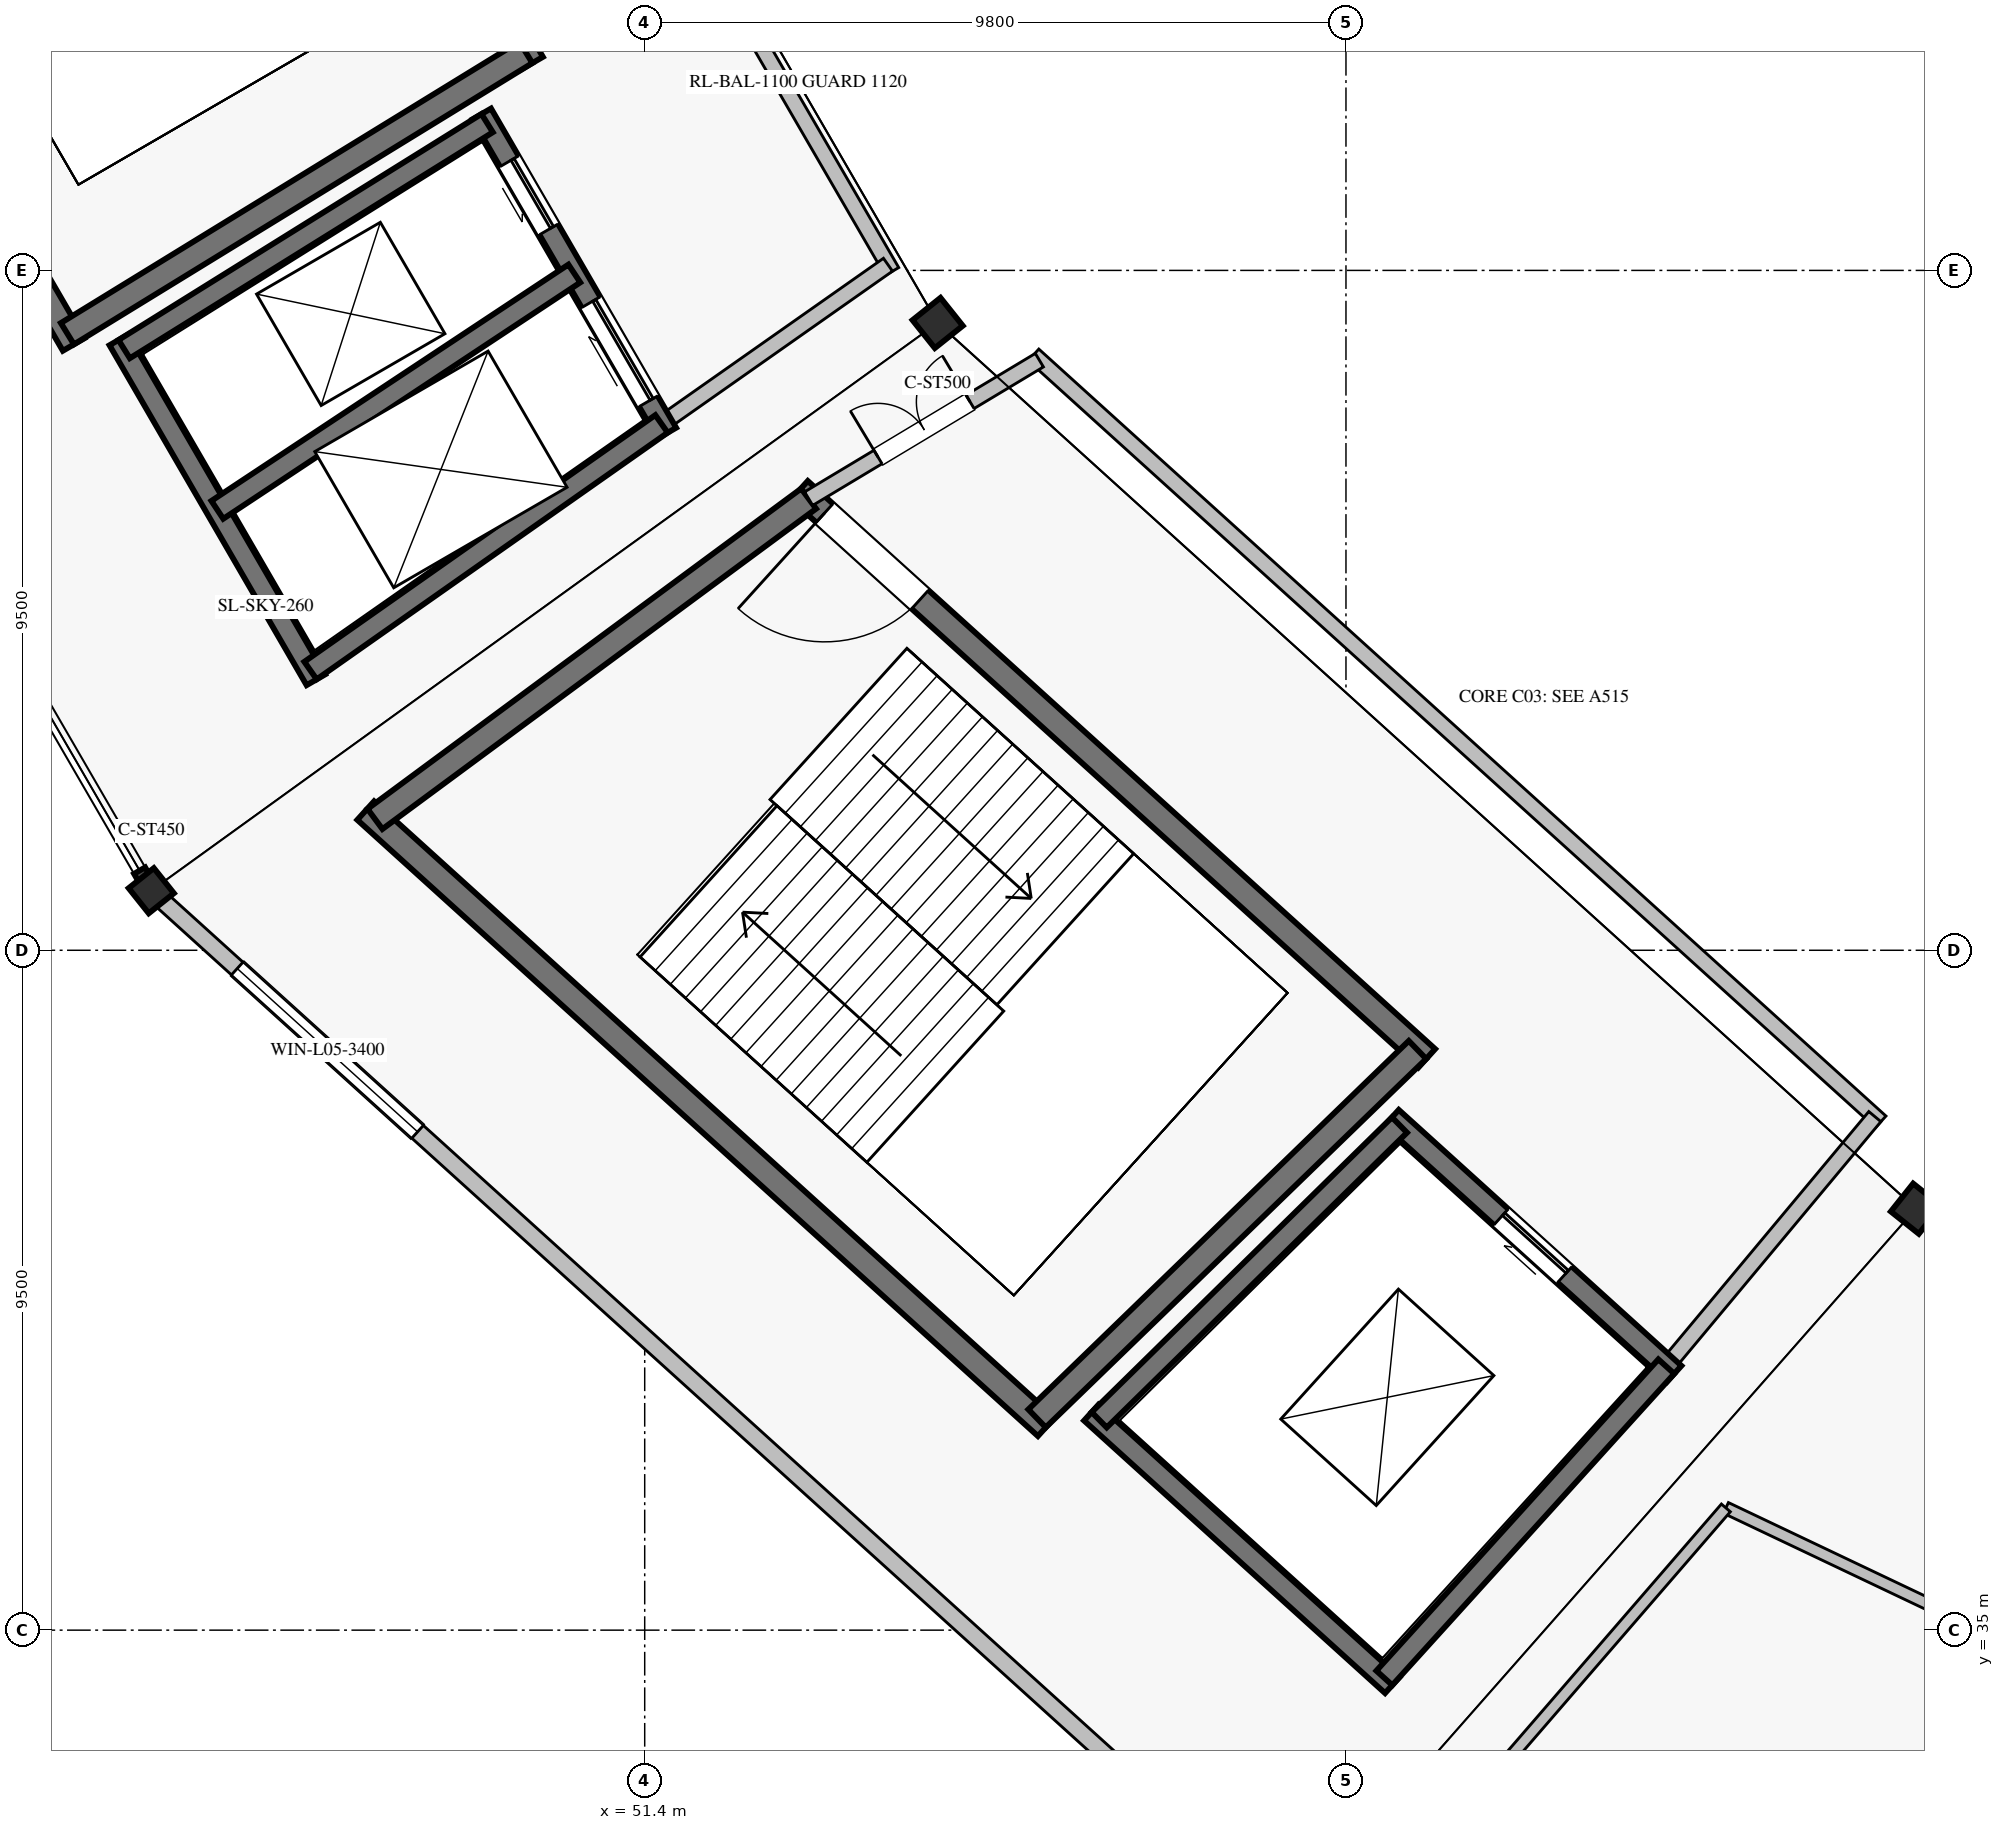
"""IFC4 building model, lengths in metres.
Left out: names, types, materials, properties, quantities, classifications, styles, units other than length and angle.
Written with IfcOpenShell. Run it as: python <this file> out.ifc"""

import sys

from ifc_helpers import new_model, si_unit, direction, frame, frame_2d, origin, origin_2d, place, context, subcontext, project, spatial, rectangle, hollow_rectangle, extrude, element, fill, save


model = new_model("IFC4")
c1 = context("Model", 3, precision=1e-05, world=origin(), true_north=direction((0.0, 1.0)))
c2 = subcontext(c1, "Body", "Model", "MODEL_VIEW")
j1 = project(units=[si_unit("LENGTHUNIT", "METRE"), si_unit("PLANEANGLEUNIT", "RADIAN")], contexts=[c1])
p1 = place(None, origin())
s1 = spatial("IfcSite", under=j1, at=p1, CompositionType="ELEMENT")
p2 = place(p1, origin())
s2 = spatial("IfcBuilding", under=s1, at=p2, CompositionType="ELEMENT")
p3 = place(p2, frame((0.0, 0.0, 25.84)))
s3 = spatial("IfcBuildingStorey", under=s2, at=p3, CompositionType="ELEMENT", Elevation=25.84)
for number, where, z_axis, x_axis in (
    (1, (55.494, 53.266, 0.0), (0.0, 0.0, 1.0), (-0.782, -0.623, 0.0)),
    (2, (69.166, 40.889, 0.0), (0.0, 0.0, 1.0), (-0.623, -0.782, 0.0)),
):
    element("IfcColumn", number, at=place(p3, frame(where, z_axis=z_axis, x_axis=x_axis)), inside=s3, PredefinedType="COLUMN", context=c2, shape_type="SweptSolid", body=[
        extrude(hollow_rectangle(XDim=0.5, YDim=0.5, WallThickness=0.022, at=origin_2d()), origin(), (0.0, 0.0, 1.0), 5.44),
    ])
p4 = place(p3, frame((44.505, 45.332, 0.0), z_axis=(0.0, 0.0, 1.0), x_axis=(-0.781831482473, -0.623489801853, 0.0)))
e3 = element("IfcColumn", 3, at=p4, inside=s3, PredefinedType="COLUMN", context=c2, shape_type="SweptSolid", body=[
    extrude(hollow_rectangle(XDim=0.45, YDim=0.45, WallThickness=0.022, at=origin_2d()), origin(), (0.0, 0.0, 1.0), 5.44),
])
p5 = place(p3, frame((44.668, 45.185, 0.0), z_axis=(0.0, 0.0, 1.0), x_axis=(0.741349049196, -0.671119651967, 0.0)))
e4 = element("IfcWall", 4, at=p5, inside=s3, PredefinedType="SOLIDWALL", context=c2, shape_type="SweptSolid", body=[
    extrude(rectangle(XDim=21.004, YDim=0.24, at=frame_2d((10.502, 0.0))), origin(), (0.0, 0.0, 1.0), 4.53),
])
p6 = place(p5, frame((1.4, 0.0, 1.0)))
e5 = element("IfcOpeningElement", 5, at=p6, cuts=e4, PredefinedType="OPENING", context=c2, shape_type="SweptSolid", body=[
    extrude(rectangle(XDim=3.4, YDim=2.3, at=frame_2d((1.7, 1.15))), frame((0.0, 0.13, 0.0), z_axis=(0.0, -1.0, 0.0), x_axis=(1.0, 0.0, 0.0)), (0.0, 0.0, 1.0), 0.26),
])
p7 = place(p3, frame((44.09, 66.788, 0.0), z_axis=(0.0, 0.0, 1.0), x_axis=(0.501628624814, -0.865083072755, 0.0)))
e6 = element("IfcWall", 6, at=p7, inside=s3, PredefinedType="SHEAR", context=c2, shape_type="SweptSolid", body=[
    extrude(rectangle(XDim=11.435, YDim=0.35, at=frame_2d((5.718, 0.0))), origin(), (0.0, 0.0, 1.0), 5.18),
])
p8 = place(p7, frame((0.475, 0.0, 0.0)))
e7 = element("IfcOpeningElement", 7, at=p8, cuts=e6, PredefinedType="OPENING", context=c2, shape_type="SweptSolid", body=[
    extrude(rectangle(XDim=1.8, YDim=2.2, at=frame_2d((0.9, 1.1))), frame((0.0, 0.185, 0.0), z_axis=(0.0, -1.0, 0.0), x_axis=(1.0, 0.0, 0.0)), (0.0, 0.0, 1.0), 0.37),
])
p9 = place(p3, frame((37.198, 63.695, 0.0), z_axis=(0.0, 0.0, 1.0), x_axis=(0.501601740165, -0.865098661577, 0.0)))
e8 = element("IfcWall", 8, at=p9, inside=s3, PredefinedType="SHEAR", context=c2, shape_type="SweptSolid", body=[
    extrude(rectangle(XDim=12.405, YDim=0.35, at=frame_2d((6.202, 0.0))), origin(), (0.0, 0.0, 1.0), 5.18),
])
p10 = place(p3, frame((49.739, 57.046, 0.0), z_axis=(0.0, 0.0, 1.0), x_axis=(-0.852334575619, -0.522996913188, 0.0)))
e9 = element("IfcWall", 9, at=p10, inside=s3, PredefinedType="SHEAR", context=c2, shape_type="SweptSolid", body=[
    extrude(rectangle(XDim=7.516, YDim=0.35, at=frame_2d((3.758, 0.0))), origin(), (0.0, 0.0, 1.0), 5.18),
])
p11 = place(p3, frame((49.123, 56.188, 0.0), z_axis=(0.0, 0.0, 1.0), x_axis=(0.501629534056, -0.86508254552, 0.0)))
e10 = element("IfcWall", 10, at=p11, inside=s3, PredefinedType="SHEAR", context=c2, shape_type="SweptSolid", body=[
    extrude(rectangle(XDim=5.157, YDim=0.3, at=frame_2d((2.579, 0.0))), origin(), (0.0, 0.0, 1.0), 5.18),
])
p12 = place(p11, frame((0.766, 0.0, 0.0)))
e11 = element("IfcOpeningElement", 11, at=p12, cuts=e10, PredefinedType="OPENING", context=c2, shape_type="SweptSolid", body=[
    extrude(rectangle(XDim=1.1, YDim=2.2, at=frame_2d((0.55, 1.1))), frame((0.0, 0.16, 0.0), z_axis=(0.0, -1.0, 0.0), x_axis=(1.0, 0.0, 0.0)), (0.0, 0.0, 1.0), 0.32),
])
p13 = place(p11, frame((3.042, 0.0, 0.0)))
e12 = element("IfcOpeningElement", 12, at=p13, cuts=e10, PredefinedType="OPENING", context=c2, shape_type="SweptSolid", body=[
    extrude(rectangle(XDim=1.6, YDim=2.3, at=frame_2d((0.8, 1.15))), frame((0.0, 0.16, 0.0), z_axis=(0.0, -1.0, 0.0), x_axis=(1.0, 0.0, 0.0)), (0.0, 0.0, 1.0), 0.32),
])
p14 = place(p3, frame((44.05, 53.03, 0.0), z_axis=(0.0, 0.0, 1.0), x_axis=(0.501596987756, -0.865101417103, 0.0)))
e13 = element("IfcWall", 13, at=p14, inside=s3, PredefinedType="SHEAR", context=c2, shape_type="SweptSolid", body=[
    extrude(rectangle(XDim=5.491, YDim=0.3, at=frame_2d((2.746, 0.0))), origin(), (0.0, 0.0, 1.0), 5.18),
])
p15 = place(p3, frame((49.198, 56.058, 0.0), z_axis=(0.0, 0.0, 1.0), x_axis=(-0.848938067893, -0.528492343257, 0.0)))
e14 = element("IfcWall", 14, at=p15, inside=s3, PredefinedType="SHEAR", context=c2, shape_type="SweptSolid", body=[
    extrude(rectangle(XDim=5.975, YDim=0.3, at=frame_2d((2.988, 0.0))), origin(), (0.0, 0.0, 1.0), 5.18),
])
p16 = place(p3, frame((51.635, 51.855, 0.0), z_axis=(0.0, 0.0, 1.0), x_axis=(-0.818205158105, -0.574926359851, 0.0)))
e15 = element("IfcWall", 15, at=p16, inside=s3, PredefinedType="SHEAR", context=c2, shape_type="SweptSolid", body=[
    extrude(rectangle(XDim=5.995, YDim=0.3, at=frame_2d((2.998, 0.0))), origin(), (0.0, 0.0, 1.0), 5.18),
])
p17 = place(p3, frame((50.417, 53.957, 0.0), z_axis=(0.0, 0.0, 1.0), x_axis=(-0.833878900042, -0.551947443209, 0.0)))
e16 = element("IfcWall", 16, at=p17, inside=s3, PredefinedType="SHEAR", context=c2, shape_type="SweptSolid", body=[
    extrude(rectangle(XDim=5.983, YDim=0.3, at=frame_2d((2.991, 0.0))), origin(), (0.0, 0.0, 1.0), 5.18),
])
p18 = place(p3, frame((46.774, 67.921, 0.0), z_axis=(0.0, 0.0, 1.0), x_axis=(0.501612626242, -0.865092349518, 0.0)))
e17 = element("IfcWall", 17, at=p18, inside=s3, PredefinedType="SOLIDWALL", context=c2, shape_type="SweptSolid", body=[
    extrude(rectangle(XDim=16.11, YDim=0.22, at=frame_2d((8.055, 0.0))), origin(), (0.0, 0.0, 1.0), 5.18),
])
p19 = place(p3, frame((54.8, 54.079, 0.0), z_axis=(0.0, 0.0, 1.0), x_axis=(-0.818225400643, -0.574897550649, 0.0)))
e18 = element("IfcWall", 18, at=p19, inside=s3, PredefinedType="SOLIDWALL", context=c2, shape_type="SweptSolid", body=[
    extrude(rectangle(XDim=3.868, YDim=0.22, at=frame_2d((1.934, 0.0))), origin(), (0.0, 0.0, 1.0), 5.18),
])
p20 = place(p3, frame((53.561, 50.928, 0.0), z_axis=(0.0, 0.0, 1.0), x_axis=(0.741358227035, -0.671109513572, 0.0)))
e19 = element("IfcWall", 19, at=p20, inside=s3, PredefinedType="SHEAR", context=c2, shape_type="SweptSolid", body=[
    extrude(rectangle(XDim=11.827, YDim=0.35, at=frame_2d((5.913, 0.0))), origin(), (0.0, 0.0, 1.0), 5.18),
])
p21 = place(p20, frame((0.475, 0.0, 0.0)))
e20 = element("IfcOpeningElement", 20, at=p21, cuts=e19, PredefinedType="OPENING", context=c2, shape_type="SweptSolid", body=[
    extrude(rectangle(XDim=1.8, YDim=2.2, at=frame_2d((0.9, 1.1))), frame((0.0, 0.185, 0.0), z_axis=(0.0, -1.0, 0.0), x_axis=(1.0, 0.0, 0.0)), (0.0, 0.0, 1.0), 0.37),
])
p22 = place(p3, frame((47.501, 46.452, 0.0), z_axis=(0.0, 0.0, 1.0), x_axis=(0.741351373721, -0.671117084183, 0.0)))
e21 = element("IfcWall", 21, at=p22, inside=s3, PredefinedType="SHEAR", context=c2, shape_type="SweptSolid", body=[
    extrude(rectangle(XDim=12.83, YDim=0.35, at=frame_2d((6.415, 0.0))), origin(), (0.0, 0.0, 1.0), 5.18),
])
p23 = place(p3, frame((53.691, 50.811, 0.0), z_axis=(0.0, 0.0, 1.0), x_axis=(-0.804395625347, -0.594093997548, 0.0)))
e22 = element("IfcWall", 22, at=p23, inside=s3, PredefinedType="SHEAR", context=c2, shape_type="SweptSolid", body=[
    extrude(rectangle(XDim=7.534, YDim=0.35, at=frame_2d((3.767, 0.0))), origin(), (0.0, 0.0, 1.0), 5.18),
])
p24 = place(p3, frame((62.199, 43.108, 0.0), z_axis=(0.0, 0.0, 1.0), x_axis=(-0.718297398554, -0.69573619083, 0.0)))
e23 = element("IfcWall", 23, at=p24, inside=s3, PredefinedType="SHEAR", context=c2, shape_type="SweptSolid", body=[
    extrude(rectangle(XDim=7.402, YDim=0.35, at=frame_2d((3.701, 0.0))), origin(), (0.0, 0.0, 1.0), 5.18),
])
p25 = place(p3, frame((61.837, 42.159, 0.0), z_axis=(0.0, 0.0, 1.0), x_axis=(0.741350155641, -0.671118429736, 0.0)))
e24 = element("IfcWall", 24, at=p25, inside=s3, PredefinedType="SHEAR", context=c2, shape_type="SweptSolid", body=[
    extrude(rectangle(XDim=5.329, YDim=0.3, at=frame_2d((2.665, 0.0))), origin(), (0.0, 0.0, 1.0), 5.18),
])
p26 = place(p25, frame((2.065, 0.0, 0.0)))
e25 = element("IfcOpeningElement", 25, at=p26, cuts=e24, PredefinedType="OPENING", context=c2, shape_type="SweptSolid", body=[
    extrude(rectangle(XDim=1.2, YDim=2.2, at=frame_2d((0.6, 1.1))), frame((0.0, 0.16, 0.0), z_axis=(0.0, -1.0, 0.0), x_axis=(1.0, 0.0, 0.0)), (0.0, 0.0, 1.0), 0.32),
])
p27 = place(p3, frame((57.64, 38.039, 0.0), z_axis=(0.0, 0.0, 1.0), x_axis=(0.74134208775, -0.671127341815, 0.0)))
e26 = element("IfcWall", 26, at=p27, inside=s3, PredefinedType="SHEAR", context=c2, shape_type="SweptSolid", body=[
    extrude(rectangle(XDim=5.675, YDim=0.3, at=frame_2d((2.837, 0.0))), origin(), (0.0, 0.0, 1.0), 5.18),
])
p28 = place(p3, frame((61.948, 42.059, 0.0), z_axis=(0.0, 0.0, 1.0), x_axis=(-0.713553028001, -0.700601224828, 0.0)))
e27 = element("IfcWall", 27, at=p28, inside=s3, PredefinedType="SHEAR", context=c2, shape_type="SweptSolid", body=[
    extrude(rectangle(XDim=5.881, YDim=0.3, at=frame_2d((2.94, 0.0))), origin(), (0.0, 0.0, 1.0), 5.18),
])
p29 = place(p3, frame((65.676, 38.684, 0.0), z_axis=(0.0, 0.0, 1.0), x_axis=(-0.67115829282, -0.741314067031, 0.0)))
e28 = element("IfcWall", 28, at=p29, inside=s3, PredefinedType="SHEAR", context=c2, shape_type="SweptSolid", body=[
    extrude(rectangle(XDim=5.871, YDim=0.3, at=frame_2d((2.935, 0.0))), origin(), (0.0, 0.0, 1.0), 5.18),
])
p30 = place(p3, frame((56.834, 52.819, 0.0), z_axis=(0.0, 0.0, 1.0), x_axis=(0.741351035574, -0.671117457717, 0.0)))
e29 = element("IfcWall", 29, at=p30, inside=s3, PredefinedType="SOLIDWALL", context=c2, shape_type="SweptSolid", body=[
    extrude(rectangle(XDim=15.969, YDim=0.22, at=frame_2d((7.985, 0.0))), origin(), (0.0, 0.0, 1.0), 5.18),
])
p31 = place(p3, frame((56.915, 52.746, 0.0), z_axis=(0.0, 0.0, 1.0), x_axis=(-0.857424171966, -0.514610327654, 0.0)))
e30 = element("IfcWall", 30, at=p31, inside=s3, PredefinedType="SOLIDWALL", context=c2, shape_type="SweptSolid", body=[
    extrude(rectangle(XDim=3.76, YDim=0.22, at=frame_2d((1.88, 0.0))), origin(), (0.0, 0.0, 1.0), 5.18),
])
p32 = place(p31, frame((1.13, 0.0, 0.0)))
e31 = element("IfcOpeningElement", 31, at=p32, cuts=e30, PredefinedType="OPENING", context=c2, shape_type="SweptSolid", body=[
    extrude(rectangle(XDim=1.5, YDim=2.2, at=frame_2d((0.75, 1.1))), frame((0.0, 0.12, 0.0), z_axis=(0.0, -1.0, 0.0), x_axis=(1.0, 0.0, 0.0)), (0.0, 0.0, 1.0), 0.24),
])
p33 = place(p3, frame((68.591, 42.176, 0.0), z_axis=(0.0, 0.0, 1.0), x_axis=(-0.640759627034, -0.767741558315, 0.0)))
e32 = element("IfcWall", 32, at=p33, inside=s3, PredefinedType="SOLIDWALL", context=c2, shape_type="SweptSolid", body=[
    extrude(rectangle(XDim=4.549, YDim=0.22, at=frame_2d((2.274, 0.0))), origin(), (0.0, 0.0, 1.0), 5.18),
])
p34 = place(p3, frame((66.509, 36.708, 0.0), z_axis=(0.0, 0.0, 1.0), x_axis=(0.90321677741, -0.429184637429, 0.0)))
e33 = element("IfcWall", 33, at=p34, inside=s3, PredefinedType="PARTITIONING", context=c2, shape_type="SweptSolid", body=[
    extrude(rectangle(XDim=18.427, YDim=0.165, at=frame_2d((9.214, 0.0))), origin(), (0.0, 0.0, 1.0), 4.5),
])
p35 = place(p34, frame((8.739, 0.0, 0.0)))
e34 = element("IfcOpeningElement", 34, at=p35, cuts=e33, PredefinedType="OPENING", context=c2, shape_type="SweptSolid", body=[
    extrude(rectangle(XDim=0.95, YDim=2.15, at=frame_2d((0.475, 1.075))), frame((0.0, 0.093, 0.0), z_axis=(0.0, -1.0, 0.0), x_axis=(1.0, 0.0, 0.0)), (0.0, 0.0, 1.0), 0.185),
])
p36 = place(p3, frame((66.509, 36.708, 0.0), z_axis=(0.0, 0.0, 1.0), x_axis=(-0.654288201841, -0.7562452968, 0.0)))
e35 = element("IfcWall", 35, at=p36, inside=s3, PredefinedType="PARTITIONING", context=c2, shape_type="SweptSolid", body=[
    extrude(rectangle(XDim=7.368, YDim=0.165, at=frame_2d((3.684, 0.0))), origin(), (0.0, 0.0, 1.0), 4.5),
])
p37 = place(p6, origin())
e36 = element("IfcWindow", 36, at=p37, inside=s3, PartitioningType="SINGLE_PANEL", PredefinedType="WINDOW", context=c2, shape_type="SweptSolid", body=[
    extrude(rectangle(XDim=3.4, YDim=2.3, at=frame_2d((1.7, 1.15))), frame((0.0, 0.03, 0.0), z_axis=(0.0, -1.0, 0.0), x_axis=(1.0, 0.0, 0.0)), (0.0, 0.0, 1.0), 0.06),
])
fill(e5, e36)
p38 = place(p12, origin())
e37 = element("IfcDoor", 37, at=p38, inside=s3, OperationType="SLIDING_TO_RIGHT", PredefinedType="DOOR", context=c2, shape_type="SweptSolid", body=[
    extrude(rectangle(XDim=1.1, YDim=2.2, at=frame_2d((0.55, 1.1))), frame((0.0, 0.025, 0.0), z_axis=(0.0, -1.0, 0.0), x_axis=(1.0, 0.0, 0.0)), (0.0, 0.0, 1.0), 0.05),
])
fill(e11, e37)
p39 = place(p13, origin())
e38 = element("IfcDoor", 38, at=p39, inside=s3, OperationType="SLIDING_TO_LEFT", PredefinedType="DOOR", context=c2, shape_type="SweptSolid", body=[
    extrude(rectangle(XDim=1.6, YDim=2.3, at=frame_2d((0.8, 1.15))), frame((0.0, 0.025, 0.0), z_axis=(0.0, -1.0, 0.0), x_axis=(1.0, 0.0, 0.0)), (0.0, 0.0, 1.0), 0.05),
])
fill(e12, e38)
p40 = place(p21, frame((1.8, 0.0, 0.0), z_axis=(0.0, 0.0, 1.0), x_axis=(-1.0, 0.0, 0.0)))
e39 = element("IfcDoor", 39, at=p40, inside=s3, OperationType="SINGLE_SWING_RIGHT", PredefinedType="DOOR", context=c2, shape_type="SweptSolid", body=[
    extrude(rectangle(XDim=1.8, YDim=2.2, at=frame_2d((0.9, 1.1))), frame((0.0, 0.025, 0.0), z_axis=(0.0, -1.0, 0.0), x_axis=(1.0, 0.0, 0.0)), (0.0, 0.0, 1.0), 0.05),
])
fill(e20, e39)
p41 = place(p26, origin())
e40 = element("IfcDoor", 40, at=p41, inside=s3, OperationType="SLIDING_TO_LEFT", PredefinedType="DOOR", context=c2, shape_type="SweptSolid", body=[
    extrude(rectangle(XDim=1.2, YDim=2.2, at=frame_2d((0.6, 1.1))), frame((0.0, 0.025, 0.0), z_axis=(0.0, -1.0, 0.0), x_axis=(1.0, 0.0, 0.0)), (0.0, 0.0, 1.0), 0.05),
])
fill(e25, e40)
p42 = place(p32, frame((1.5, 0.0, 0.0), z_axis=(0.0, 0.0, 1.0), x_axis=(-1.0, 0.0, 0.0)))
e41 = element("IfcDoor", 41, at=p42, inside=s3, OperationType="DOUBLE_DOOR_SINGLE_SWING", PredefinedType="DOOR", context=c2, shape_type="SweptSolid", body=[
    extrude(rectangle(XDim=1.5, YDim=2.2, at=frame_2d((0.75, 1.1))), frame((0.0, 0.025, 0.0), z_axis=(0.0, -1.0, 0.0), x_axis=(1.0, 0.0, 0.0)), (0.0, 0.0, 1.0), 0.05),
])
fill(e31, e41)
save(model, sys.argv[1])
